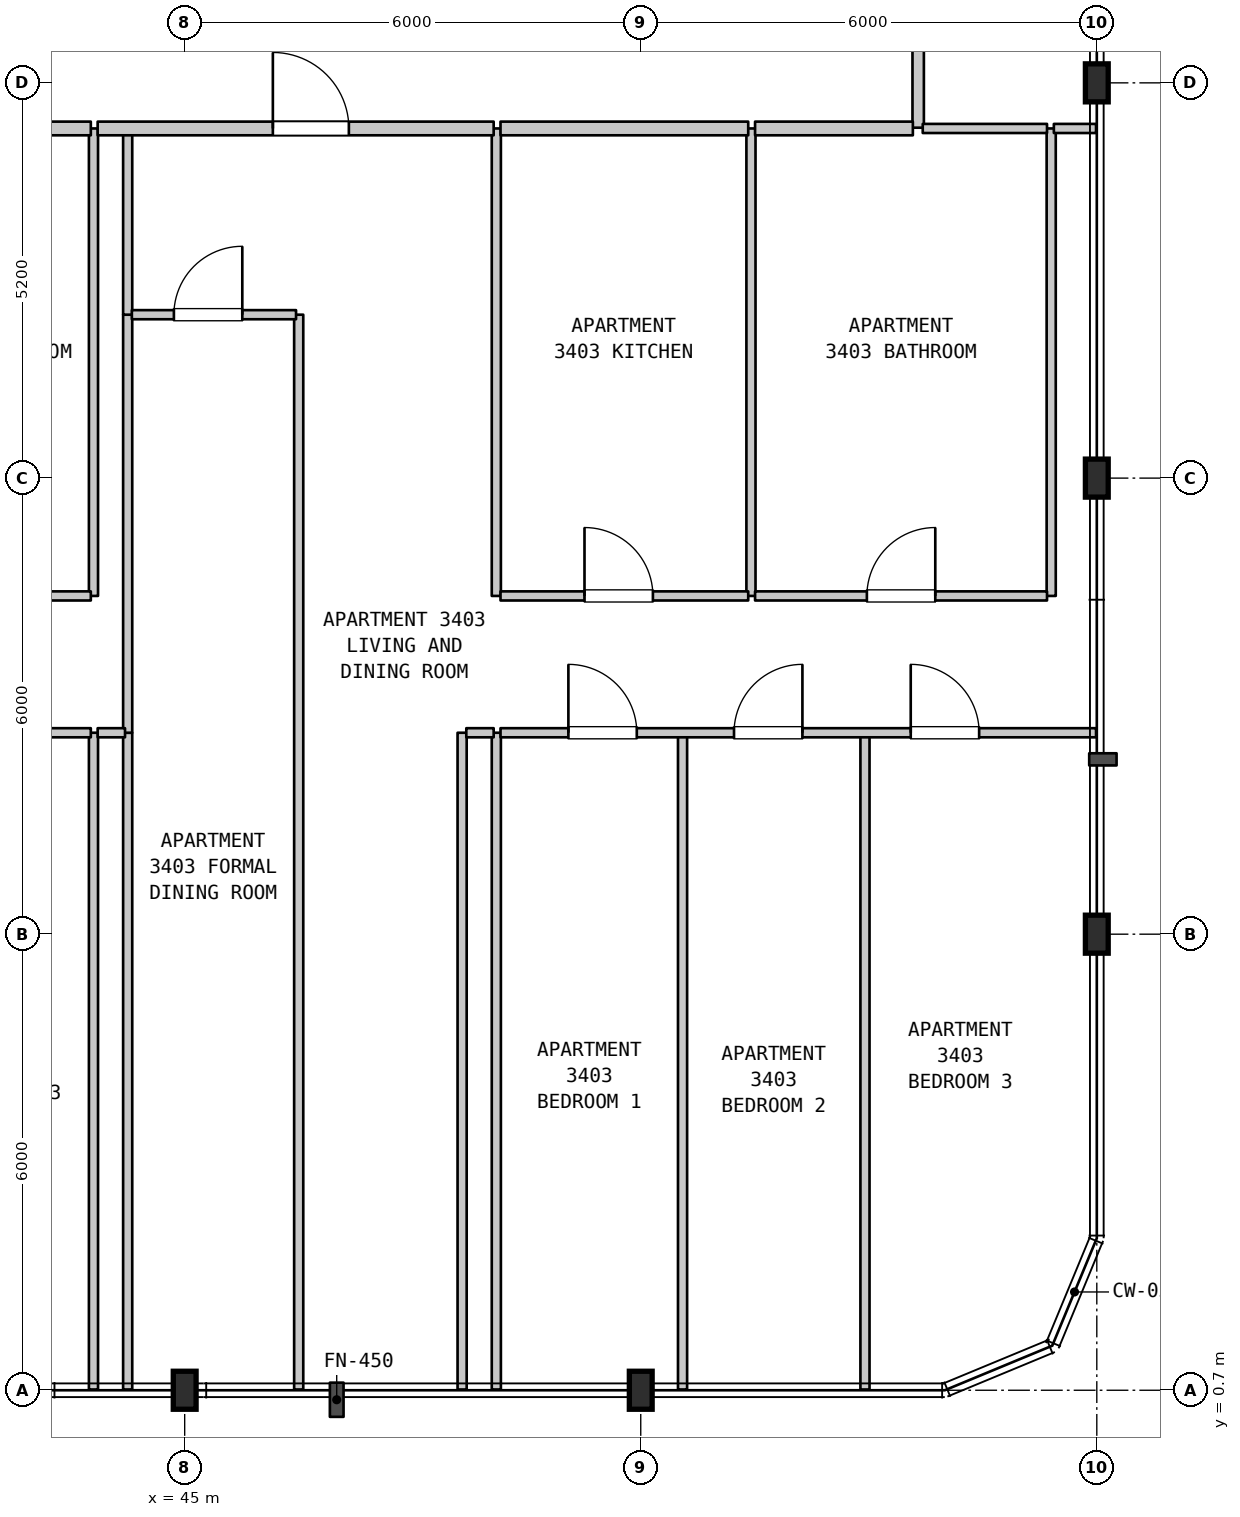
"""IFC4 building model, lengths in metres.
Left out: names, types, materials, properties, quantities, classifications, styles, units other than length and angle.
Written with IfcOpenShell. Run it as: python <this file> out.ifc"""

import sys

from ifc_helpers import new_model, si_unit, direction, frame, frame_2d, origin, origin_2d, place, context, subcontext, project, spatial, rectangle, i_section, extrude, element, fill, save


model = new_model("IFC4")
c1 = context("Model", 3, precision=1e-05, world=origin(), true_north=direction((0.0, 1.0)))
c2 = subcontext(c1, "Body", "Model", "MODEL_VIEW")
j1 = project(units=[si_unit("LENGTHUNIT", "METRE"), si_unit("PLANEANGLEUNIT", "RADIAN")], contexts=[c1])
p1 = place(None, origin())
s1 = spatial("IfcSite", under=j1, at=p1, CompositionType="ELEMENT")
p2 = place(p1, origin())
s2 = spatial("IfcBuilding", under=s1, at=p2, CompositionType="ELEMENT")
p3 = place(p2, frame((0.0, 0.0, 140.9)))
s3 = spatial("IfcBuildingStorey", under=s2, at=p3, CompositionType="ELEMENT", Elevation=140.9)
for number, where, z_axis, x_axis in (
    (1, (45.0, 0.7, 0.0), (0.0, 0.0, 1.0), (1.0, 0.0, 0.0)),
    (2, (51.0, 0.7, 0.0), (0.0, 0.0, 1.0), (1.0, 0.0, 0.0)),
    (3, (57.0, 6.7, 0.0), (0.0, 0.0, 1.0), (1.0, 0.0, 0.0)),
    (4, (57.0, 12.7, 0.0), (0.0, 0.0, 1.0), (1.0, 0.0, 0.0)),
    (5, (57.0, 17.9, 0.0), (0.0, 0.0, 1.0), (1.0, 0.0, 0.0)),
):
    element("IfcColumn", number, at=place(p3, frame(where, z_axis=z_axis, x_axis=x_axis)), inside=s3, PredefinedType="COLUMN", context=c2, shape_type="SweptSolid", body=[
        extrude(i_section(OverallWidth=0.3, OverallDepth=0.5, WebThickness=0.014, FlangeThickness=0.028, FilletRadius=0.027, at=origin_2d()), origin(), (0.0, 0.0, 1.0), 3.7),
    ])
p4 = place(p3, frame((43.8, 0.71, 0.0), z_axis=(0.0, 0.0, 1.0), x_axis=(0.0, 1.0, 0.0)))
e6 = element("IfcWall", 6, at=p4, inside=s3, PredefinedType="PARTITIONING", context=c2, shape_type="SweptSolid", body=[
    extrude(rectangle(XDim=8.64, YDim=0.12, at=frame_2d((4.32, 0.0))), origin(), (0.0, 0.0, 1.0), 3.385),
])
p5 = place(p3, frame((43.8, 11.15, 0.0), z_axis=(0.0, 0.0, 1.0), x_axis=(0.0, 1.0, 0.0)))
e7 = element("IfcWall", 7, at=p5, inside=s3, PredefinedType="PARTITIONING", context=c2, shape_type="SweptSolid", body=[
    extrude(rectangle(XDim=6.15, YDim=0.12, at=frame_2d((3.075, 0.0))), origin(), (0.0, 0.0, 1.0), 3.385),
])
p6 = place(p3, frame((44.25, 0.71, 0.0), z_axis=(0.0, 0.0, 1.0), x_axis=(0.0, 1.0, 0.0)))
e8 = element("IfcWall", 8, at=p6, inside=s3, PredefinedType="PARTITIONING", context=c2, shape_type="SweptSolid", body=[
    extrude(rectangle(XDim=8.64, YDim=0.12, at=frame_2d((4.32, 0.0))), origin(), (0.0, 0.0, 1.0), 3.385),
])
p7 = place(p3, frame((44.25, 9.35, 0.0), z_axis=(0.0, 0.0, 1.0), x_axis=(0.0, 1.0, 0.0)))
e9 = element("IfcWall", 9, at=p7, inside=s3, PredefinedType="PARTITIONING", context=c2, shape_type="SweptSolid", body=[
    extrude(rectangle(XDim=5.5, YDim=0.12, at=frame_2d((2.75, 0.0))), origin(), (0.0, 0.0, 1.0), 3.385),
])
p8 = place(p3, frame((44.25, 14.85, 0.0), z_axis=(0.0, 0.0, 1.0), x_axis=(0.0, 1.0, 0.0)))
e10 = element("IfcWall", 10, at=p8, inside=s3, PredefinedType="PARTITIONING", context=c2, shape_type="SweptSolid", body=[
    extrude(rectangle(XDim=2.45, YDim=0.12, at=frame_2d((1.225, 0.0))), origin(), (0.0, 0.0, 1.0), 3.385),
])
p9 = place(p3, frame((46.5, 0.71, 0.0), z_axis=(0.0, 0.0, 1.0), x_axis=(0.0, 1.0, 0.0)))
e11 = element("IfcWall", 11, at=p9, inside=s3, PredefinedType="PARTITIONING", context=c2, shape_type="SweptSolid", body=[
    extrude(rectangle(XDim=14.14, YDim=0.12, at=frame_2d((7.07, 0.0))), origin(), (0.0, 0.0, 1.0), 3.385),
])
for number, where, z_axis, x_axis in (
    (12, (48.65, 0.71, 0.0), (0.0, 0.0, 1.0), (0.0, 1.0, 0.0)),
    (13, (49.1, 0.71, 0.0), (0.0, 0.0, 1.0), (0.0, 1.0, 0.0)),
):
    element("IfcWall", number, at=place(p3, frame(where, z_axis=z_axis, x_axis=x_axis)), inside=s3, PredefinedType="PARTITIONING", context=c2, shape_type="SweptSolid", body=[
        extrude(rectangle(XDim=8.64, YDim=0.12, at=frame_2d((4.32, 0.0))), origin(), (0.0, 0.0, 1.0), 3.385),
    ])
p10 = place(p3, frame((49.1, 11.15, 0.0), z_axis=(0.0, 0.0, 1.0), x_axis=(0.0, 1.0, 0.0)))
e14 = element("IfcWall", 14, at=p10, inside=s3, PredefinedType="PARTITIONING", context=c2, shape_type="SweptSolid", body=[
    extrude(rectangle(XDim=6.15, YDim=0.12, at=frame_2d((3.075, 0.0))), origin(), (0.0, 0.0, 1.0), 3.385),
])
p11 = place(p3, frame((51.55, 0.71, 0.0), z_axis=(0.0, 0.0, 1.0), x_axis=(0.0, 1.0, 0.0)))
e15 = element("IfcWall", 15, at=p11, inside=s3, PredefinedType="PARTITIONING", context=c2, shape_type="SweptSolid", body=[
    extrude(rectangle(XDim=8.64, YDim=0.12, at=frame_2d((4.32, 0.0))), origin(), (0.0, 0.0, 1.0), 3.385),
])
p12 = place(p3, frame((52.45, 11.15, 0.0), z_axis=(0.0, 0.0, 1.0), x_axis=(0.0, 1.0, 0.0)))
e16 = element("IfcWall", 16, at=p12, inside=s3, PredefinedType="PARTITIONING", context=c2, shape_type="SweptSolid", body=[
    extrude(rectangle(XDim=6.15, YDim=0.12, at=frame_2d((3.075, 0.0))), origin(), (0.0, 0.0, 1.0), 3.385),
])
p13 = place(p3, frame((53.95, 0.71, 0.0), z_axis=(0.0, 0.0, 1.0), x_axis=(0.0, 1.0, 0.0)))
e17 = element("IfcWall", 17, at=p13, inside=s3, PredefinedType="PARTITIONING", context=c2, shape_type="SweptSolid", body=[
    extrude(rectangle(XDim=8.64, YDim=0.12, at=frame_2d((4.32, 0.0))), origin(), (0.0, 0.0, 1.0), 3.385),
])
p14 = place(p3, frame((54.65, 17.31, 0.0), z_axis=(0.0, 0.0, 1.0), x_axis=(0.0, 1.0, 0.0)))
e18 = element("IfcWall", 18, at=p14, inside=s3, PredefinedType="STANDARD", context=c2, shape_type="SweptSolid", body=[
    extrude(rectangle(XDim=2.19, YDim=0.15, at=frame_2d((1.095, 0.0))), origin(), (0.0, 0.0, 1.0), 3.385),
])
p15 = place(p3, frame((56.4, 11.15, 0.0), z_axis=(0.0, 0.0, 1.0), x_axis=(0.0, 1.0, 0.0)))
e19 = element("IfcWall", 19, at=p15, inside=s3, PredefinedType="PARTITIONING", context=c2, shape_type="SweptSolid", body=[
    extrude(rectangle(XDim=6.15, YDim=0.12, at=frame_2d((3.075, 0.0))), origin(), (0.0, 0.0, 1.0), 3.385),
])
p16 = place(p3, frame((34.795, 9.35, 0.0), z_axis=(0.0, 0.0, 1.0), x_axis=(1.0, 0.0, 0.0)))
e20 = element("IfcWall", 20, at=p16, inside=s3, PredefinedType="PARTITIONING", context=c2, shape_type="SweptSolid", body=[
    extrude(rectangle(XDim=8.97, YDim=0.12, at=frame_2d((4.485, 0.0))), origin(), (0.0, 0.0, 1.0), 3.385),
])
p17 = place(p16, frame((1.119, 0.0, 0.0)))
e21 = element("IfcOpeningElement", 21, at=p17, cuts=e20, PredefinedType="OPENING", context=c2, shape_type="SweptSolid", body=[
    extrude(rectangle(XDim=0.9, YDim=2.15, at=frame_2d((0.45, 1.075))), frame((0.0, 0.07, 0.0), z_axis=(0.0, -1.0, 0.0), x_axis=(1.0, 0.0, 0.0)), (0.0, 0.0, 1.0), 0.14),
])
p18 = place(p16, frame((3.962, 0.0, 0.0)))
e22 = element("IfcOpeningElement", 22, at=p18, cuts=e20, PredefinedType="OPENING", context=c2, shape_type="SweptSolid", body=[
    extrude(rectangle(XDim=0.9, YDim=2.15, at=frame_2d((0.45, 1.075))), frame((0.0, 0.07, 0.0), z_axis=(0.0, -1.0, 0.0), x_axis=(1.0, 0.0, 0.0)), (0.0, 0.0, 1.0), 0.14),
])
p19 = place(p16, frame((6.809, 0.0, 0.0)))
e23 = element("IfcOpeningElement", 23, at=p19, cuts=e20, PredefinedType="OPENING", context=c2, shape_type="SweptSolid", body=[
    extrude(rectangle(XDim=0.9, YDim=2.15, at=frame_2d((0.45, 1.075))), frame((0.0, 0.07, 0.0), z_axis=(0.0, -1.0, 0.0), x_axis=(1.0, 0.0, 0.0)), (0.0, 0.0, 1.0), 0.14),
])
p20 = place(p3, frame((43.855, 9.35, 0.0), z_axis=(0.0, 0.0, 1.0), x_axis=(1.0, 0.0, 0.0)))
e24 = element("IfcWall", 24, at=p20, inside=s3, PredefinedType="PARTITIONING", context=c2, shape_type="SweptSolid", body=[
    extrude(rectangle(XDim=0.36, YDim=0.12, at=frame_2d((0.18, 0.0))), origin(), (0.0, 0.0, 1.0), 3.385),
])
p21 = place(p3, frame((48.705, 9.35, 0.0), z_axis=(0.0, 0.0, 1.0), x_axis=(1.0, 0.0, 0.0)))
e25 = element("IfcWall", 25, at=p21, inside=s3, PredefinedType="PARTITIONING", context=c2, shape_type="SweptSolid", body=[
    extrude(rectangle(XDim=0.36, YDim=0.12, at=frame_2d((0.18, 0.0))), origin(), (0.0, 0.0, 1.0), 3.385),
])
p22 = place(p3, frame((49.155, 9.35, 0.0), z_axis=(0.0, 0.0, 1.0), x_axis=(1.0, 0.0, 0.0)))
e26 = element("IfcWall", 26, at=p22, inside=s3, PredefinedType="PARTITIONING", context=c2, shape_type="SweptSolid", body=[
    extrude(rectangle(XDim=7.835, YDim=0.12, at=frame_2d((3.917, 0.0))), origin(), (0.0, 0.0, 1.0), 3.385),
])
p23 = place(p22, frame((0.893, 0.0, 0.0)))
e27 = element("IfcOpeningElement", 27, at=p23, cuts=e26, PredefinedType="OPENING", context=c2, shape_type="SweptSolid", body=[
    extrude(rectangle(XDim=0.9, YDim=2.15, at=frame_2d((0.45, 1.075))), frame((0.0, 0.07, 0.0), z_axis=(0.0, -1.0, 0.0), x_axis=(1.0, 0.0, 0.0)), (0.0, 0.0, 1.0), 0.14),
])
p24 = place(p22, frame((3.072, 0.0, 0.0)))
e28 = element("IfcOpeningElement", 28, at=p24, cuts=e26, PredefinedType="OPENING", context=c2, shape_type="SweptSolid", body=[
    extrude(rectangle(XDim=0.9, YDim=2.15, at=frame_2d((0.45, 1.075))), frame((0.0, 0.07, 0.0), z_axis=(0.0, -1.0, 0.0), x_axis=(1.0, 0.0, 0.0)), (0.0, 0.0, 1.0), 0.14),
])
p25 = place(p22, frame((5.397, 0.0, 0.0)))
e29 = element("IfcOpeningElement", 29, at=p25, cuts=e26, PredefinedType="OPENING", context=c2, shape_type="SweptSolid", body=[
    extrude(rectangle(XDim=0.9, YDim=2.15, at=frame_2d((0.45, 1.075))), frame((0.0, 0.07, 0.0), z_axis=(0.0, -1.0, 0.0), x_axis=(1.0, 0.0, 0.0)), (0.0, 0.0, 1.0), 0.14),
])
p26 = place(p3, frame((41.318, 11.15, 0.0), z_axis=(0.0, 0.0, 1.0), x_axis=(1.0, 0.0, 0.0)))
e30 = element("IfcWall", 30, at=p26, inside=s3, PredefinedType="PARTITIONING", context=c2, shape_type="SweptSolid", body=[
    extrude(rectangle(XDim=2.447, YDim=0.12, at=frame_2d((1.223, 0.0))), origin(), (0.0, 0.0, 1.0), 3.385),
])
p27 = place(p26, frame((0.774, 0.0, 0.0)))
e31 = element("IfcOpeningElement", 31, at=p27, cuts=e30, PredefinedType="OPENING", context=c2, shape_type="SweptSolid", body=[
    extrude(rectangle(XDim=0.9, YDim=2.1, at=frame_2d((0.45, 1.05))), frame((0.0, 0.07, 0.0), z_axis=(0.0, -1.0, 0.0), x_axis=(1.0, 0.0, 0.0)), (0.0, 0.0, 1.0), 0.14),
])
p28 = place(p3, frame((49.155, 11.15, 0.0), z_axis=(0.0, 0.0, 1.0), x_axis=(1.0, 0.0, 0.0)))
e32 = element("IfcWall", 32, at=p28, inside=s3, PredefinedType="PARTITIONING", context=c2, shape_type="SweptSolid", body=[
    extrude(rectangle(XDim=3.259, YDim=0.12, at=frame_2d((1.629, 0.0))), origin(), (0.0, 0.0, 1.0), 3.385),
])
p29 = place(p28, frame((1.105, 0.0, 0.0)))
e33 = element("IfcOpeningElement", 33, at=p29, cuts=e32, PredefinedType="OPENING", context=c2, shape_type="SweptSolid", body=[
    extrude(rectangle(XDim=0.9, YDim=2.15, at=frame_2d((0.45, 1.075))), frame((0.0, 0.07, 0.0), z_axis=(0.0, -1.0, 0.0), x_axis=(1.0, 0.0, 0.0)), (0.0, 0.0, 1.0), 0.14),
])
p30 = place(p3, frame((52.504, 11.15, 0.0), z_axis=(0.0, 0.0, 1.0), x_axis=(1.0, 0.0, 0.0)))
e34 = element("IfcWall", 34, at=p30, inside=s3, PredefinedType="PARTITIONING", context=c2, shape_type="SweptSolid", body=[
    extrude(rectangle(XDim=3.841, YDim=0.12, at=frame_2d((1.92, 0.0))), origin(), (0.0, 0.0, 1.0), 3.385),
])
p31 = place(p30, frame((1.471, 0.0, 0.0)))
e35 = element("IfcOpeningElement", 35, at=p31, cuts=e34, PredefinedType="OPENING", context=c2, shape_type="SweptSolid", body=[
    extrude(rectangle(XDim=0.9, YDim=2.1, at=frame_2d((0.45, 1.05))), frame((0.0, 0.07, 0.0), z_axis=(0.0, -1.0, 0.0), x_axis=(1.0, 0.0, 0.0)), (0.0, 0.0, 1.0), 0.14),
])
p32 = place(p3, frame((44.305, 14.85, 0.0), z_axis=(0.0, 0.0, 1.0), x_axis=(1.0, 0.0, 0.0)))
e36 = element("IfcWall", 36, at=p32, inside=s3, PredefinedType="PARTITIONING", context=c2, shape_type="SweptSolid", body=[
    extrude(rectangle(XDim=2.16, YDim=0.12, at=frame_2d((1.08, 0.0))), origin(), (0.0, 0.0, 1.0), 3.385),
])
p33 = place(p32, frame((0.553, 0.0, 0.0)))
e37 = element("IfcOpeningElement", 37, at=p33, cuts=e36, PredefinedType="OPENING", context=c2, shape_type="SweptSolid", body=[
    extrude(rectangle(XDim=0.9, YDim=2.15, at=frame_2d((0.45, 1.075))), frame((0.0, 0.07, 0.0), z_axis=(0.0, -1.0, 0.0), x_axis=(1.0, 0.0, 0.0)), (0.0, 0.0, 1.0), 0.14),
])
p34 = place(p3, frame((41.318, 17.3, 0.0), z_axis=(0.0, 0.0, 1.0), x_axis=(1.0, 0.0, 0.0)))
e38 = element("IfcWall", 38, at=p34, inside=s3, PredefinedType="STANDARD", context=c2, shape_type="SweptSolid", body=[
    extrude(rectangle(XDim=2.447, YDim=0.18, at=frame_2d((1.223, 0.0))), origin(), (0.0, 0.0, 1.0), 3.385),
])
p35 = place(p3, frame((43.855, 17.3, 0.0), z_axis=(0.0, 0.0, 1.0), x_axis=(1.0, 0.0, 0.0)))
e39 = element("IfcWall", 39, at=p35, inside=s3, PredefinedType="STANDARD", context=c2, shape_type="SweptSolid", body=[
    extrude(rectangle(XDim=5.21, YDim=0.18, at=frame_2d((2.605, 0.0))), origin(), (0.0, 0.0, 1.0), 3.385),
])
p36 = place(p35, frame((2.305, 0.0, 0.0)))
e40 = element("IfcOpeningElement", 40, at=p36, cuts=e39, PredefinedType="OPENING", context=c2, shape_type="SweptSolid", body=[
    extrude(rectangle(XDim=1.0, YDim=2.15, at=frame_2d((0.5, 1.075))), frame((0.0, 0.1, 0.0), z_axis=(0.0, -1.0, 0.0), x_axis=(1.0, 0.0, 0.0)), (0.0, 0.0, 1.0), 0.2),
])
p37 = place(p3, frame((49.155, 17.3, 0.0), z_axis=(0.0, 0.0, 1.0), x_axis=(1.0, 0.0, 0.0)))
e41 = element("IfcWall", 41, at=p37, inside=s3, PredefinedType="STANDARD", context=c2, shape_type="SweptSolid", body=[
    extrude(rectangle(XDim=3.259, YDim=0.18, at=frame_2d((1.629, 0.0))), origin(), (0.0, 0.0, 1.0), 3.385),
])
p38 = place(p3, frame((52.504, 17.3, 0.0), z_axis=(0.0, 0.0, 1.0), x_axis=(1.0, 0.0, 0.0)))
e42 = element("IfcWall", 42, at=p38, inside=s3, PredefinedType="STANDARD", context=c2, shape_type="SweptSolid", body=[
    extrude(rectangle(XDim=2.076, YDim=0.18, at=frame_2d((1.038, 0.0))), origin(), (0.0, 0.0, 1.0), 3.385),
])
p39 = place(p3, frame((54.71, 17.3, 0.0), z_axis=(0.0, 0.0, 1.0), x_axis=(1.0, 0.0, 0.0)))
e43 = element("IfcWall", 43, at=p39, inside=s3, PredefinedType="PARTITIONING", context=c2, shape_type="SweptSolid", body=[
    extrude(rectangle(XDim=1.635, YDim=0.12, at=frame_2d((0.817, 0.0))), origin(), (0.0, 0.0, 1.0), 3.385),
])
p40 = place(p3, frame((56.435, 17.3, 0.0), z_axis=(0.0, 0.0, 1.0), x_axis=(1.0, 0.0, 0.0)))
e44 = element("IfcWall", 44, at=p40, inside=s3, PredefinedType="PARTITIONING", context=c2, shape_type="SweptSolid", body=[
    extrude(rectangle(XDim=0.555, YDim=0.12, at=frame_2d((0.277, 0.0))), origin(), (0.0, 0.0, 1.0), 3.385),
])
p41 = place(p23, origin())
e45 = element("IfcDoor", 45, at=p41, inside=s3, OperationType="SINGLE_SWING_LEFT", PredefinedType="DOOR", context=c2, shape_type="SweptSolid", body=[
    extrude(rectangle(XDim=0.9, YDim=2.15, at=frame_2d((0.45, 1.075))), frame((0.0, 0.025, 0.0), z_axis=(0.0, -1.0, 0.0), x_axis=(1.0, 0.0, 0.0)), (0.0, 0.0, 1.0), 0.05),
])
fill(e27, e45)
p42 = place(p24, origin())
e46 = element("IfcDoor", 46, at=p42, inside=s3, OperationType="SINGLE_SWING_RIGHT", PredefinedType="DOOR", context=c2, shape_type="SweptSolid", body=[
    extrude(rectangle(XDim=0.9, YDim=2.15, at=frame_2d((0.45, 1.075))), frame((0.0, 0.025, 0.0), z_axis=(0.0, -1.0, 0.0), x_axis=(1.0, 0.0, 0.0)), (0.0, 0.0, 1.0), 0.05),
])
fill(e28, e46)
p43 = place(p25, origin())
e47 = element("IfcDoor", 47, at=p43, inside=s3, OperationType="SINGLE_SWING_LEFT", PredefinedType="DOOR", context=c2, shape_type="SweptSolid", body=[
    extrude(rectangle(XDim=0.9, YDim=2.15, at=frame_2d((0.45, 1.075))), frame((0.0, 0.025, 0.0), z_axis=(0.0, -1.0, 0.0), x_axis=(1.0, 0.0, 0.0)), (0.0, 0.0, 1.0), 0.05),
])
fill(e29, e47)
p44 = place(p29, origin())
e48 = element("IfcDoor", 48, at=p44, inside=s3, OperationType="SINGLE_SWING_LEFT", PredefinedType="DOOR", context=c2, shape_type="SweptSolid", body=[
    extrude(rectangle(XDim=0.9, YDim=2.15, at=frame_2d((0.45, 1.075))), frame((0.0, 0.025, 0.0), z_axis=(0.0, -1.0, 0.0), x_axis=(1.0, 0.0, 0.0)), (0.0, 0.0, 1.0), 0.05),
])
fill(e33, e48)
p45 = place(p31, origin())
e49 = element("IfcDoor", 49, at=p45, inside=s3, OperationType="SINGLE_SWING_RIGHT", PredefinedType="DOOR", context=c2, shape_type="SweptSolid", body=[
    extrude(rectangle(XDim=0.9, YDim=2.1, at=frame_2d((0.45, 1.05))), frame((0.0, 0.025, 0.0), z_axis=(0.0, -1.0, 0.0), x_axis=(1.0, 0.0, 0.0)), (0.0, 0.0, 1.0), 0.05),
])
fill(e35, e49)
p46 = place(p33, origin())
e50 = element("IfcDoor", 50, at=p46, inside=s3, OperationType="SINGLE_SWING_RIGHT", PredefinedType="DOOR", context=c2, shape_type="SweptSolid", body=[
    extrude(rectangle(XDim=0.9, YDim=2.15, at=frame_2d((0.45, 1.075))), frame((0.0, 0.025, 0.0), z_axis=(0.0, -1.0, 0.0), x_axis=(1.0, 0.0, 0.0)), (0.0, 0.0, 1.0), 0.05),
])
fill(e37, e50)
p47 = place(p36, origin())
e51 = element("IfcDoor", 51, at=p47, inside=s3, OperationType="SINGLE_SWING_LEFT", PredefinedType="DOOR", context=c2, shape_type="SweptSolid", body=[
    extrude(rectangle(XDim=1.0, YDim=2.15, at=frame_2d((0.5, 1.075))), frame((0.0, 0.025, 0.0), z_axis=(0.0, -1.0, 0.0), x_axis=(1.0, 0.0, 0.0)), (0.0, 0.0, 1.0), 0.05),
])
fill(e40, e51)
save(model, sys.argv[1])
